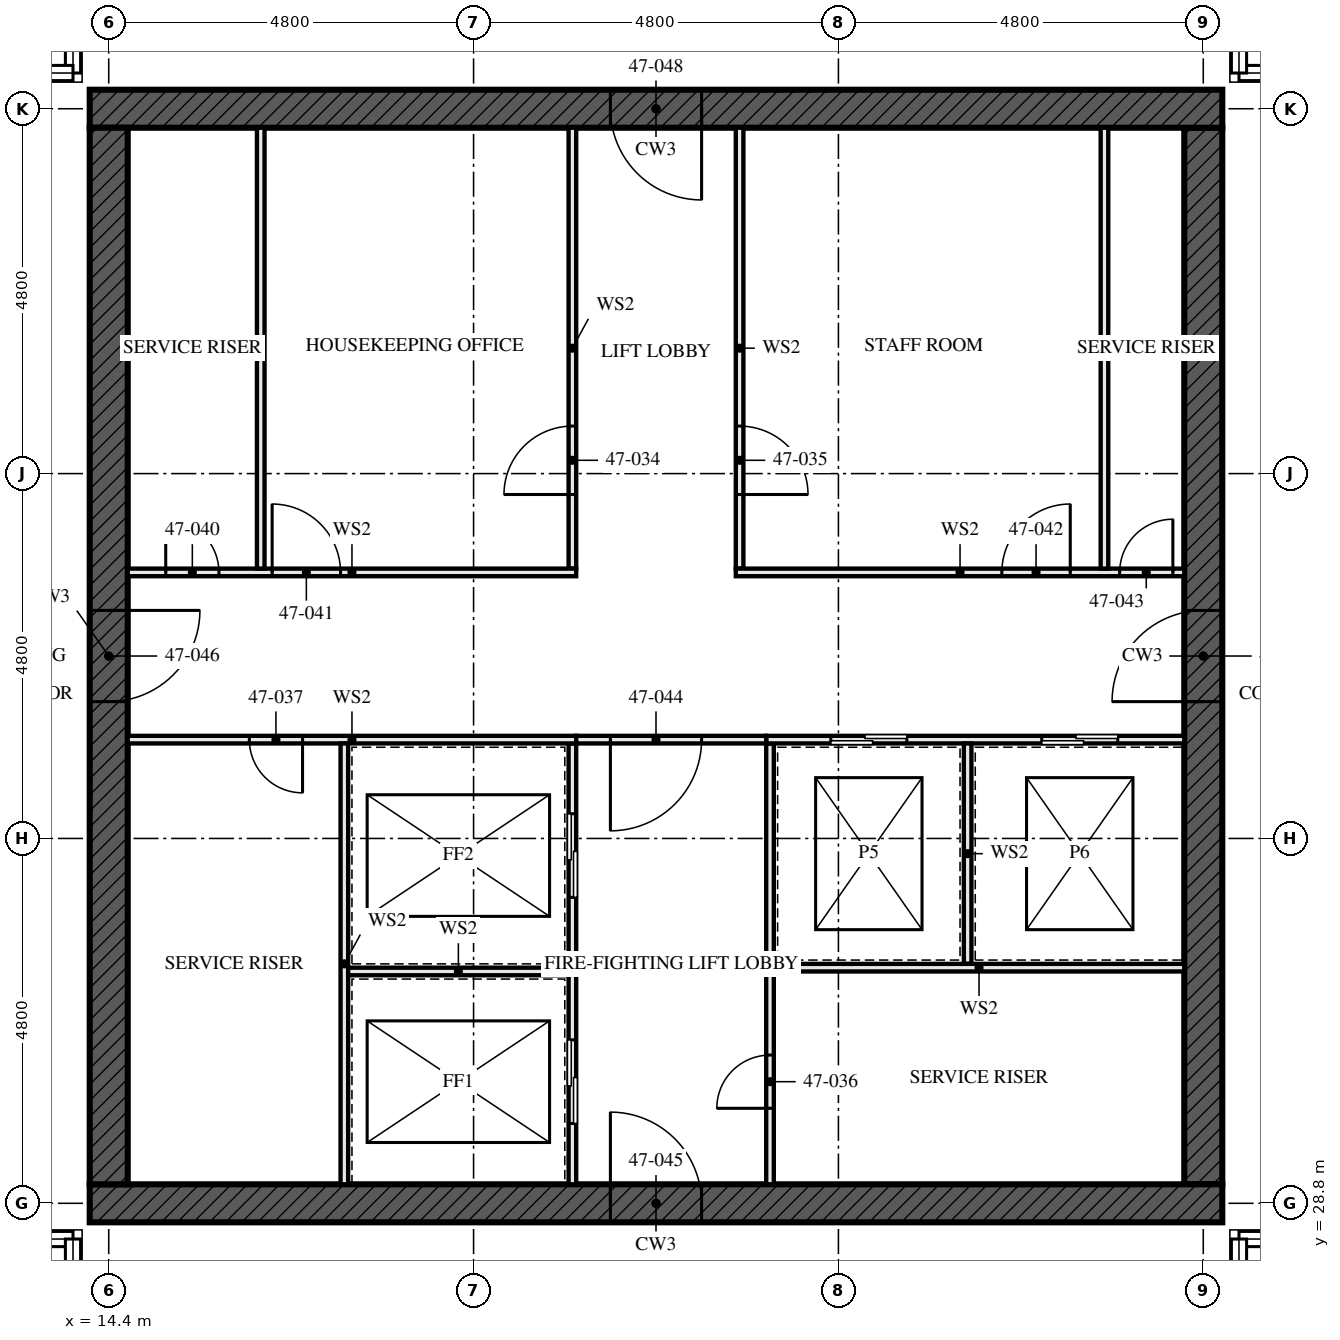
"""IFC4 building model, lengths in metres.
Left out: names, types, materials, properties, quantities, classifications, styles, units other than length and angle.
Written with IfcOpenShell. Run it as: python <this file> out.ifc"""

import sys

from ifc_helpers import new_model, si_unit, direction, frame, frame_2d, origin, place, context, subcontext, project, spatial, rectangle, extrude, element, fill, save


model = new_model("IFC4")
c1 = context("Model", 3, precision=1e-05, world=origin(), true_north=direction((0.0, 1.0)))
c2 = subcontext(c1, "Body", "Model", "MODEL_VIEW")
j1 = project(units=[si_unit("LENGTHUNIT", "METRE"), si_unit("PLANEANGLEUNIT", "RADIAN")], contexts=[c1])
p1 = place(None, origin())
s1 = spatial("IfcSite", under=j1, at=p1, CompositionType="ELEMENT")
p2 = place(p1, origin())
s2 = spatial("IfcBuilding", under=s1, at=p2, CompositionType="ELEMENT")
p3 = place(p2, frame((0.0, 0.0, 172.5)))
s3 = spatial("IfcBuildingStorey", under=s2, at=p3, CompositionType="ELEMENT", Elevation=172.5)
p4 = place(p3, frame((14.15, 28.8, -0.17), z_axis=(0.0, 0.0, 1.0), x_axis=(1.0, 0.0, 0.0)))
e1 = element("IfcWall", 1, at=p4, inside=s3, PredefinedType="SHEAR", context=c2, shape_type="SweptSolid", body=[
    extrude(rectangle(XDim=14.9, YDim=0.5, at=frame_2d((7.45, 0.0))), origin(), (0.0, 0.0, 1.0), 3.5),
])
p5 = place(p4, frame((6.85, 0.0, 0.17)))
e2 = element("IfcOpeningElement", 2, at=p5, cuts=e1, PredefinedType="OPENING", context=c2, shape_type="SweptSolid", body=[
    extrude(rectangle(XDim=1.2, YDim=2.1, at=frame_2d((0.6, 1.05))), frame((0.0, 0.26, 0.0), z_axis=(0.0, -1.0, 0.0), x_axis=(1.0, 0.0, 0.0)), (0.0, 0.0, 1.0), 0.521),
])
p6 = place(p3, frame((29.05, 43.2, -0.17), z_axis=(0.0, 0.0, 1.0), x_axis=(-1.0, 0.0, 0.0)))
e3 = element("IfcWall", 3, at=p6, inside=s3, PredefinedType="SHEAR", context=c2, shape_type="SweptSolid", body=[
    extrude(rectangle(XDim=14.9, YDim=0.5, at=frame_2d((7.45, 0.0))), origin(), (0.0, 0.0, 1.0), 3.5),
])
p7 = place(p6, frame((6.85, 0.0, 0.17)))
e4 = element("IfcOpeningElement", 4, at=p7, cuts=e3, PredefinedType="OPENING", context=c2, shape_type="SweptSolid", body=[
    extrude(rectangle(XDim=1.2, YDim=2.1, at=frame_2d((0.6, 1.05))), frame((0.0, 0.26, 0.0), z_axis=(0.0, -1.0, 0.0), x_axis=(1.0, 0.0, 0.0)), (0.0, 0.0, 1.0), 0.521),
])
p8 = place(p3, frame((14.4, 42.95, -0.17), z_axis=(0.0, 0.0, 1.0), x_axis=(0.0, -1.0, 0.0)))
e5 = element("IfcWall", 5, at=p8, inside=s3, PredefinedType="SHEAR", context=c2, shape_type="SweptSolid", body=[
    extrude(rectangle(XDim=13.9, YDim=0.5, at=frame_2d((6.95, 0.0))), origin(), (0.0, 0.0, 1.0), 3.5),
])
p9 = place(p8, frame((6.35, 0.0, 0.17)))
e6 = element("IfcOpeningElement", 6, at=p9, cuts=e5, PredefinedType="OPENING", context=c2, shape_type="SweptSolid", body=[
    extrude(rectangle(XDim=1.2, YDim=2.1, at=frame_2d((0.6, 1.05))), frame((0.0, 0.26, 0.0), z_axis=(0.0, -1.0, 0.0), x_axis=(1.0, 0.0, 0.0)), (0.0, 0.0, 1.0), 0.521),
])
p10 = place(p3, frame((28.8, 29.05, -0.17), z_axis=(0.0, 0.0, 1.0), x_axis=(0.0, 1.0, 0.0)))
e7 = element("IfcWall", 7, at=p10, inside=s3, PredefinedType="SHEAR", context=c2, shape_type="SweptSolid", body=[
    extrude(rectangle(XDim=13.9, YDim=0.5, at=frame_2d((6.95, 0.0))), origin(), (0.0, 0.0, 1.0), 3.5),
])
p11 = place(p10, frame((6.35, 0.0, 0.17)))
e8 = element("IfcOpeningElement", 8, at=p11, cuts=e7, PredefinedType="OPENING", context=c2, shape_type="SweptSolid", body=[
    extrude(rectangle(XDim=1.2, YDim=2.1, at=frame_2d((0.6, 1.05))), frame((0.0, 0.26, 0.0), z_axis=(0.0, -1.0, 0.0), x_axis=(1.0, 0.0, 0.0)), (0.0, 0.0, 1.0), 0.521),
])
for number, where, z_axis, x_axis in (
    (9, (16.4, 37.15, 0.0), (0.0, 0.0, 1.0), (0.0, 1.0, 0.0)),
    (10, (27.5, 37.15, 0.0), (0.0, 0.0, 1.0), (0.0, 1.0, 0.0)),
):
    element("IfcWall", number, at=place(p3, frame(where, z_axis=z_axis, x_axis=x_axis)), inside=s3, PredefinedType="SOLIDWALL", context=c2, shape_type="SweptSolid", body=[
        extrude(rectangle(XDim=5.8, YDim=0.1, at=frame_2d((2.9, 0.0))), origin(), (0.0, 0.0, 1.0), 3.33),
    ])
p12 = place(p3, frame((20.5, 29.05, 0.0), z_axis=(0.0, 0.0, 1.0), x_axis=(0.0, 1.0, 0.0)))
e11 = element("IfcWall", 11, at=p12, inside=s3, PredefinedType="SOLIDWALL", context=c2, shape_type="SweptSolid", body=[
    extrude(rectangle(XDim=5.8, YDim=0.1, at=frame_2d((2.9, 0.0))), origin(), (0.0, 0.0, 1.0), 3.33),
])
p13 = place(p12, frame((0.8, 0.0, 0.0)))
e12 = element("IfcOpeningElement", 12, at=p13, cuts=e11, PredefinedType="OPENING", context=c2, shape_type="SweptSolid", body=[
    extrude(rectangle(XDim=1.1, YDim=2.3, at=frame_2d((0.55, 1.15))), frame((0.0, 0.061, 0.0), z_axis=(0.0, -1.0, 0.0), x_axis=(1.0, 0.0, 0.0)), (0.0, 0.0, 1.0), 0.121),
])
p14 = place(p12, frame((3.775, 0.0, 0.0)))
e13 = element("IfcOpeningElement", 13, at=p14, cuts=e11, PredefinedType="OPENING", context=c2, shape_type="SweptSolid", body=[
    extrude(rectangle(XDim=1.1, YDim=2.3, at=frame_2d((0.55, 1.15))), frame((0.0, 0.061, 0.0), z_axis=(0.0, -1.0, 0.0), x_axis=(1.0, 0.0, 0.0)), (0.0, 0.0, 1.0), 0.121),
])
p15 = place(p3, frame((20.5, 37.15, 0.0), z_axis=(0.0, 0.0, 1.0), x_axis=(0.0, 1.0, 0.0)))
e14 = element("IfcWall", 14, at=p15, inside=s3, PredefinedType="SOLIDWALL", context=c2, shape_type="SweptSolid", body=[
    extrude(rectangle(XDim=5.8, YDim=0.1, at=frame_2d((2.9, 0.0))), origin(), (0.0, 0.0, 1.0), 3.33),
])
p16 = place(p15, frame((0.975, 0.0, 0.0)))
e15 = element("IfcOpeningElement", 15, at=p16, cuts=e14, PredefinedType="OPENING", context=c2, shape_type="SweptSolid", body=[
    extrude(rectangle(XDim=0.9, YDim=2.1, at=frame_2d((0.45, 1.05))), frame((0.0, 0.061, 0.0), z_axis=(0.0, -1.0, 0.0), x_axis=(1.0, 0.0, 0.0)), (0.0, 0.0, 1.0), 0.121),
])
p17 = place(p3, frame((22.7, 37.15, 0.0), z_axis=(0.0, 0.0, 1.0), x_axis=(0.0, 1.0, 0.0)))
e16 = element("IfcWall", 16, at=p17, inside=s3, PredefinedType="SOLIDWALL", context=c2, shape_type="SweptSolid", body=[
    extrude(rectangle(XDim=5.8, YDim=0.1, at=frame_2d((2.9, 0.0))), origin(), (0.0, 0.0, 1.0), 3.33),
])
p18 = place(p17, frame((0.975, 0.0, 0.0)))
e17 = element("IfcOpeningElement", 17, at=p18, cuts=e16, PredefinedType="OPENING", context=c2, shape_type="SweptSolid", body=[
    extrude(rectangle(XDim=0.9, YDim=2.1, at=frame_2d((0.45, 1.05))), frame((0.0, 0.061, 0.0), z_axis=(0.0, -1.0, 0.0), x_axis=(1.0, 0.0, 0.0)), (0.0, 0.0, 1.0), 0.121),
])
p19 = place(p3, frame((23.1, 29.05, 0.0), z_axis=(0.0, 0.0, 1.0), x_axis=(0.0, 1.0, 0.0)))
e18 = element("IfcWall", 18, at=p19, inside=s3, PredefinedType="SOLIDWALL", context=c2, shape_type="SweptSolid", body=[
    extrude(rectangle(XDim=5.8, YDim=0.1, at=frame_2d((2.9, 0.0))), origin(), (0.0, 0.0, 1.0), 3.33),
])
p20 = place(p19, frame((1.0, 0.0, 0.0)))
e19 = element("IfcOpeningElement", 19, at=p20, cuts=e18, PredefinedType="OPENING", context=c2, shape_type="SweptSolid", body=[
    extrude(rectangle(XDim=0.7, YDim=2.1, at=frame_2d((0.35, 1.05))), frame((0.0, 0.061, 0.0), z_axis=(0.0, -1.0, 0.0), x_axis=(1.0, 0.0, 0.0)), (0.0, 0.0, 1.0), 0.121),
])
p21 = place(p3, frame((14.65, 34.9, 0.0), z_axis=(0.0, 0.0, 1.0), x_axis=(1.0, 0.0, 0.0)))
e20 = element("IfcWall", 20, at=p21, inside=s3, PredefinedType="SOLIDWALL", context=c2, shape_type="SweptSolid", body=[
    extrude(rectangle(XDim=5.9, YDim=0.1, at=frame_2d((2.95, 0.0))), origin(), (0.0, 0.0, 1.0), 3.33),
])
p22 = place(p21, frame((1.6, 0.0, 0.0)))
e21 = element("IfcOpeningElement", 21, at=p22, cuts=e20, PredefinedType="OPENING", context=c2, shape_type="SweptSolid", body=[
    extrude(rectangle(XDim=0.7, YDim=2.1, at=frame_2d((0.35, 1.05))), frame((0.0, 0.061, 0.0), z_axis=(0.0, -1.0, 0.0), x_axis=(1.0, 0.0, 0.0)), (0.0, 0.0, 1.0), 0.121),
])
p23 = place(p3, frame((23.05, 34.9, 0.0), z_axis=(0.0, 0.0, 1.0), x_axis=(1.0, 0.0, 0.0)))
e22 = element("IfcWall", 22, at=p23, inside=s3, PredefinedType="SOLIDWALL", context=c2, shape_type="SweptSolid", body=[
    extrude(rectangle(XDim=5.5, YDim=0.1, at=frame_2d((2.75, 0.0))), origin(), (0.0, 0.0, 1.0), 3.33),
])
p24 = place(p23, frame((0.85, 0.0, 0.0)))
e23 = element("IfcOpeningElement", 23, at=p24, cuts=e22, PredefinedType="OPENING", context=c2, shape_type="SweptSolid", body=[
    extrude(rectangle(XDim=1.0, YDim=2.1, at=frame_2d((0.5, 1.05))), frame((0.0, 0.061, 0.0), z_axis=(0.0, -1.0, 0.0), x_axis=(1.0, 0.0, 0.0)), (0.0, 0.0, 1.0), 0.121),
])
p25 = place(p23, frame((3.625, 0.0, 0.0)))
e24 = element("IfcOpeningElement", 24, at=p25, cuts=e22, PredefinedType="OPENING", context=c2, shape_type="SweptSolid", body=[
    extrude(rectangle(XDim=1.0, YDim=2.1, at=frame_2d((0.5, 1.05))), frame((0.0, 0.061, 0.0), z_axis=(0.0, -1.0, 0.0), x_axis=(1.0, 0.0, 0.0)), (0.0, 0.0, 1.0), 0.121),
])
p26 = place(p3, frame((14.65, 37.1, 0.0), z_axis=(0.0, 0.0, 1.0), x_axis=(1.0, 0.0, 0.0)))
e25 = element("IfcWall", 25, at=p26, inside=s3, PredefinedType="SOLIDWALL", context=c2, shape_type="SweptSolid", body=[
    extrude(rectangle(XDim=5.9, YDim=0.1, at=frame_2d((2.95, 0.0))), origin(), (0.0, 0.0, 1.0), 3.33),
])
p27 = place(p26, frame((0.5, 0.0, 0.0)))
e26 = element("IfcOpeningElement", 26, at=p27, cuts=e25, PredefinedType="OPENING", context=c2, shape_type="SweptSolid", body=[
    extrude(rectangle(XDim=0.7, YDim=2.1, at=frame_2d((0.35, 1.05))), frame((0.0, 0.061, 0.0), z_axis=(0.0, -1.0, 0.0), x_axis=(1.0, 0.0, 0.0)), (0.0, 0.0, 1.0), 0.121),
])
p28 = place(p26, frame((1.9, 0.0, 0.0)))
e27 = element("IfcOpeningElement", 27, at=p28, cuts=e25, PredefinedType="OPENING", context=c2, shape_type="SweptSolid", body=[
    extrude(rectangle(XDim=0.9, YDim=2.1, at=frame_2d((0.45, 1.05))), frame((0.0, 0.061, 0.0), z_axis=(0.0, -1.0, 0.0), x_axis=(1.0, 0.0, 0.0)), (0.0, 0.0, 1.0), 0.121),
])
p29 = place(p3, frame((22.65, 37.1, 0.0), z_axis=(0.0, 0.0, 1.0), x_axis=(1.0, 0.0, 0.0)))
e28 = element("IfcWall", 28, at=p29, inside=s3, PredefinedType="SOLIDWALL", context=c2, shape_type="SweptSolid", body=[
    extrude(rectangle(XDim=5.9, YDim=0.1, at=frame_2d((2.95, 0.0))), origin(), (0.0, 0.0, 1.0), 3.33),
])
p30 = place(p29, frame((3.5, 0.0, 0.0)))
e29 = element("IfcOpeningElement", 29, at=p30, cuts=e28, PredefinedType="OPENING", context=c2, shape_type="SweptSolid", body=[
    extrude(rectangle(XDim=0.9, YDim=2.1, at=frame_2d((0.45, 1.05))), frame((0.0, 0.061, 0.0), z_axis=(0.0, -1.0, 0.0), x_axis=(1.0, 0.0, 0.0)), (0.0, 0.0, 1.0), 0.121),
])
p31 = place(p29, frame((5.05, 0.0, 0.0)))
e30 = element("IfcOpeningElement", 30, at=p31, cuts=e28, PredefinedType="OPENING", context=c2, shape_type="SweptSolid", body=[
    extrude(rectangle(XDim=0.7, YDim=2.1, at=frame_2d((0.35, 1.05))), frame((0.0, 0.061, 0.0), z_axis=(0.0, -1.0, 0.0), x_axis=(1.0, 0.0, 0.0)), (0.0, 0.0, 1.0), 0.121),
])
p32 = place(p3, frame((20.55, 34.9, 0.0), z_axis=(0.0, 0.0, 1.0), x_axis=(1.0, 0.0, 0.0)))
e31 = element("IfcWall", 31, at=p32, inside=s3, PredefinedType="SOLIDWALL", context=c2, shape_type="SweptSolid", body=[
    extrude(rectangle(XDim=2.5, YDim=0.1, at=frame_2d((1.25, 0.0))), origin(), (0.0, 0.0, 1.0), 3.33),
])
p33 = place(p32, frame((0.45, 0.0, 0.0)))
e32 = element("IfcOpeningElement", 32, at=p33, cuts=e31, PredefinedType="OPENING", context=c2, shape_type="SweptSolid", body=[
    extrude(rectangle(XDim=1.2, YDim=2.1, at=frame_2d((0.6, 1.05))), frame((0.0, 0.061, 0.0), z_axis=(0.0, -1.0, 0.0), x_axis=(1.0, 0.0, 0.0)), (0.0, 0.0, 1.0), 0.121),
])
p34 = place(p3, frame((17.5, 29.05, 0.0), z_axis=(0.0, 0.0, 1.0), x_axis=(0.0, 1.0, 0.0)))
e33 = element("IfcWall", 33, at=p34, inside=s3, PredefinedType="SOLIDWALL", context=c2, shape_type="SweptSolid", body=[
    extrude(rectangle(XDim=5.8, YDim=0.1, at=frame_2d((2.9, 0.0))), origin(), (0.0, 0.0, 1.0), 3.33),
])
p35 = place(p3, frame((17.55, 31.85, 0.0), z_axis=(0.0, 0.0, 1.0), x_axis=(1.0, 0.0, 0.0)))
e34 = element("IfcWall", 34, at=p35, inside=s3, PredefinedType="SOLIDWALL", context=c2, shape_type="SweptSolid", body=[
    extrude(rectangle(XDim=2.9, YDim=0.1, at=frame_2d((1.45, 0.0))), origin(), (0.0, 0.0, 1.0), 3.33),
])
p36 = place(p3, frame((25.7, 31.95, 0.0), z_axis=(0.0, 0.0, 1.0), x_axis=(0.0, 1.0, 0.0)))
e35 = element("IfcWall", 35, at=p36, inside=s3, PredefinedType="SOLIDWALL", context=c2, shape_type="SweptSolid", body=[
    extrude(rectangle(XDim=2.9, YDim=0.1, at=frame_2d((1.45, 0.0))), origin(), (0.0, 0.0, 1.0), 3.33),
])
p37 = place(p3, frame((23.15, 31.9, 0.0), z_axis=(0.0, 0.0, 1.0), x_axis=(1.0, 0.0, 0.0)))
e36 = element("IfcWall", 36, at=p37, inside=s3, PredefinedType="SOLIDWALL", context=c2, shape_type="SweptSolid", body=[
    extrude(rectangle(XDim=5.4, YDim=0.1, at=frame_2d((2.7, 0.0))), origin(), (0.0, 0.0, 1.0), 3.33),
])
p38 = place(p13, origin())
e37 = element("IfcDoor", 37, at=p38, inside=s3, OperationType="SLIDING_TO_LEFT", PredefinedType="DOOR", context=c2, shape_type="SweptSolid", body=[
    extrude(rectangle(XDim=1.1, YDim=2.3, at=frame_2d((0.55, 1.15))), frame((0.0, 0.05, 0.0), z_axis=(0.0, -1.0, 0.0), x_axis=(1.0, 0.0, 0.0)), (0.0, 0.0, 1.0), 0.1),
])
fill(e12, e37)
p39 = place(p14, origin())
e38 = element("IfcDoor", 38, at=p39, inside=s3, OperationType="SLIDING_TO_LEFT", PredefinedType="DOOR", context=c2, shape_type="SweptSolid", body=[
    extrude(rectangle(XDim=1.1, YDim=2.3, at=frame_2d((0.55, 1.15))), frame((0.0, 0.05, 0.0), z_axis=(0.0, -1.0, 0.0), x_axis=(1.0, 0.0, 0.0)), (0.0, 0.0, 1.0), 0.1),
])
fill(e13, e38)
p40 = place(p16, origin())
e39 = element("IfcDoor", 39, at=p40, inside=s3, OperationType="SINGLE_SWING_RIGHT", PredefinedType="DOOR", context=c2, shape_type="SweptSolid", body=[
    extrude(rectangle(XDim=0.9, YDim=2.1, at=frame_2d((0.45, 1.05))), frame((0.0, 0.027, 0.0), z_axis=(0.0, -1.0, 0.0), x_axis=(1.0, 0.0, 0.0)), (0.0, 0.0, 1.0), 0.054),
])
fill(e15, e39)
p41 = place(p18, frame((0.9, 0.0, 0.0), z_axis=(0.0, 0.0, 1.0), x_axis=(-1.0, 0.0, 0.0)))
e40 = element("IfcDoor", 40, at=p41, inside=s3, OperationType="SINGLE_SWING_LEFT", PredefinedType="DOOR", context=c2, shape_type="SweptSolid", body=[
    extrude(rectangle(XDim=0.9, YDim=2.1, at=frame_2d((0.45, 1.05))), frame((0.0, 0.027, 0.0), z_axis=(0.0, -1.0, 0.0), x_axis=(1.0, 0.0, 0.0)), (0.0, 0.0, 1.0), 0.054),
])
fill(e17, e40)
p42 = place(p20, origin())
e41 = element("IfcDoor", 41, at=p42, inside=s3, OperationType="SINGLE_SWING_RIGHT", PredefinedType="DOOR", context=c2, shape_type="SweptSolid", body=[
    extrude(rectangle(XDim=0.7, YDim=2.1, at=frame_2d((0.35, 1.05))), frame((0.0, 0.027, 0.0), z_axis=(0.0, -1.0, 0.0), x_axis=(1.0, 0.0, 0.0)), (0.0, 0.0, 1.0), 0.054),
])
fill(e19, e41)
p43 = place(p22, frame((0.7, 0.0, 0.0), z_axis=(0.0, 0.0, 1.0), x_axis=(-1.0, 0.0, 0.0)))
e42 = element("IfcDoor", 42, at=p43, inside=s3, OperationType="SINGLE_SWING_RIGHT", PredefinedType="DOOR", context=c2, shape_type="SweptSolid", body=[
    extrude(rectangle(XDim=0.7, YDim=2.1, at=frame_2d((0.35, 1.05))), frame((0.0, 0.027, 0.0), z_axis=(0.0, -1.0, 0.0), x_axis=(1.0, 0.0, 0.0)), (0.0, 0.0, 1.0), 0.054),
])
fill(e21, e42)
p44 = place(p24, origin())
e43 = element("IfcDoor", 43, at=p44, inside=s3, OperationType="SLIDING_TO_LEFT", PredefinedType="DOOR", context=c2, shape_type="SweptSolid", body=[
    extrude(rectangle(XDim=1.0, YDim=2.1, at=frame_2d((0.5, 1.05))), frame((0.0, 0.05, 0.0), z_axis=(0.0, -1.0, 0.0), x_axis=(1.0, 0.0, 0.0)), (0.0, 0.0, 1.0), 0.1),
])
fill(e23, e43)
p45 = place(p25, origin())
e44 = element("IfcDoor", 44, at=p45, inside=s3, OperationType="SLIDING_TO_LEFT", PredefinedType="DOOR", context=c2, shape_type="SweptSolid", body=[
    extrude(rectangle(XDim=1.0, YDim=2.1, at=frame_2d((0.5, 1.05))), frame((0.0, 0.05, 0.0), z_axis=(0.0, -1.0, 0.0), x_axis=(1.0, 0.0, 0.0)), (0.0, 0.0, 1.0), 0.1),
])
fill(e24, e44)
p46 = place(p27, origin())
e45 = element("IfcDoor", 45, at=p46, inside=s3, OperationType="SINGLE_SWING_RIGHT", PredefinedType="DOOR", context=c2, shape_type="SweptSolid", body=[
    extrude(rectangle(XDim=0.7, YDim=2.1, at=frame_2d((0.35, 1.05))), frame((0.0, 0.027, 0.0), z_axis=(0.0, -1.0, 0.0), x_axis=(1.0, 0.0, 0.0)), (0.0, 0.0, 1.0), 0.054),
])
fill(e26, e45)
p47 = place(p28, origin())
e46 = element("IfcDoor", 46, at=p47, inside=s3, OperationType="SINGLE_SWING_RIGHT", PredefinedType="DOOR", context=c2, shape_type="SweptSolid", body=[
    extrude(rectangle(XDim=0.9, YDim=2.1, at=frame_2d((0.45, 1.05))), frame((0.0, 0.027, 0.0), z_axis=(0.0, -1.0, 0.0), x_axis=(1.0, 0.0, 0.0)), (0.0, 0.0, 1.0), 0.054),
])
fill(e27, e46)
p48 = place(p30, origin())
e47 = element("IfcDoor", 47, at=p48, inside=s3, OperationType="SINGLE_SWING_LEFT", PredefinedType="DOOR", context=c2, shape_type="SweptSolid", body=[
    extrude(rectangle(XDim=0.9, YDim=2.1, at=frame_2d((0.45, 1.05))), frame((0.0, 0.027, 0.0), z_axis=(0.0, -1.0, 0.0), x_axis=(1.0, 0.0, 0.0)), (0.0, 0.0, 1.0), 0.054),
])
fill(e29, e47)
p49 = place(p31, origin())
e48 = element("IfcDoor", 48, at=p49, inside=s3, OperationType="SINGLE_SWING_LEFT", PredefinedType="DOOR", context=c2, shape_type="SweptSolid", body=[
    extrude(rectangle(XDim=0.7, YDim=2.1, at=frame_2d((0.35, 1.05))), frame((0.0, 0.027, 0.0), z_axis=(0.0, -1.0, 0.0), x_axis=(1.0, 0.0, 0.0)), (0.0, 0.0, 1.0), 0.054),
])
fill(e30, e48)
p50 = place(p33, frame((1.2, 0.0, 0.0), z_axis=(0.0, 0.0, 1.0), x_axis=(-1.0, 0.0, 0.0)))
e49 = element("IfcDoor", 49, at=p50, inside=s3, OperationType="SINGLE_SWING_LEFT", PredefinedType="DOOR", context=c2, shape_type="SweptSolid", body=[
    extrude(rectangle(XDim=1.2, YDim=2.1, at=frame_2d((0.6, 1.05))), frame((0.0, 0.027, 0.0), z_axis=(0.0, -1.0, 0.0), x_axis=(1.0, 0.0, 0.0)), (0.0, 0.0, 1.0), 0.054),
])
fill(e32, e49)
p51 = place(p5, origin())
e50 = element("IfcDoor", 50, at=p51, inside=s3, OperationType="SINGLE_SWING_LEFT", PredefinedType="DOOR", context=c2, shape_type="SweptSolid", body=[
    extrude(rectangle(XDim=1.2, YDim=2.1, at=frame_2d((0.6, 1.05))), frame((0.0, 0.027, 0.0), z_axis=(0.0, -1.0, 0.0), x_axis=(1.0, 0.0, 0.0)), (0.0, 0.0, 1.0), 0.054),
])
fill(e2, e50)
p52 = place(p9, origin())
e51 = element("IfcDoor", 51, at=p52, inside=s3, OperationType="SINGLE_SWING_LEFT", PredefinedType="DOOR", context=c2, shape_type="SweptSolid", body=[
    extrude(rectangle(XDim=1.2, YDim=2.1, at=frame_2d((0.6, 1.05))), frame((0.0, 0.027, 0.0), z_axis=(0.0, -1.0, 0.0), x_axis=(1.0, 0.0, 0.0)), (0.0, 0.0, 1.0), 0.054),
])
fill(e6, e51)
p53 = place(p11, origin())
e52 = element("IfcDoor", 52, at=p53, inside=s3, OperationType="SINGLE_SWING_LEFT", PredefinedType="DOOR", context=c2, shape_type="SweptSolid", body=[
    extrude(rectangle(XDim=1.2, YDim=2.1, at=frame_2d((0.6, 1.05))), frame((0.0, 0.027, 0.0), z_axis=(0.0, -1.0, 0.0), x_axis=(1.0, 0.0, 0.0)), (0.0, 0.0, 1.0), 0.054),
])
fill(e8, e52)
p54 = place(p7, origin())
e53 = element("IfcDoor", 53, at=p54, inside=s3, OperationType="SINGLE_SWING_LEFT", PredefinedType="DOOR", context=c2, shape_type="SweptSolid", body=[
    extrude(rectangle(XDim=1.2, YDim=2.1, at=frame_2d((0.6, 1.05))), frame((0.0, 0.027, 0.0), z_axis=(0.0, -1.0, 0.0), x_axis=(1.0, 0.0, 0.0)), (0.0, 0.0, 1.0), 0.054),
])
fill(e4, e53)
save(model, sys.argv[1])
